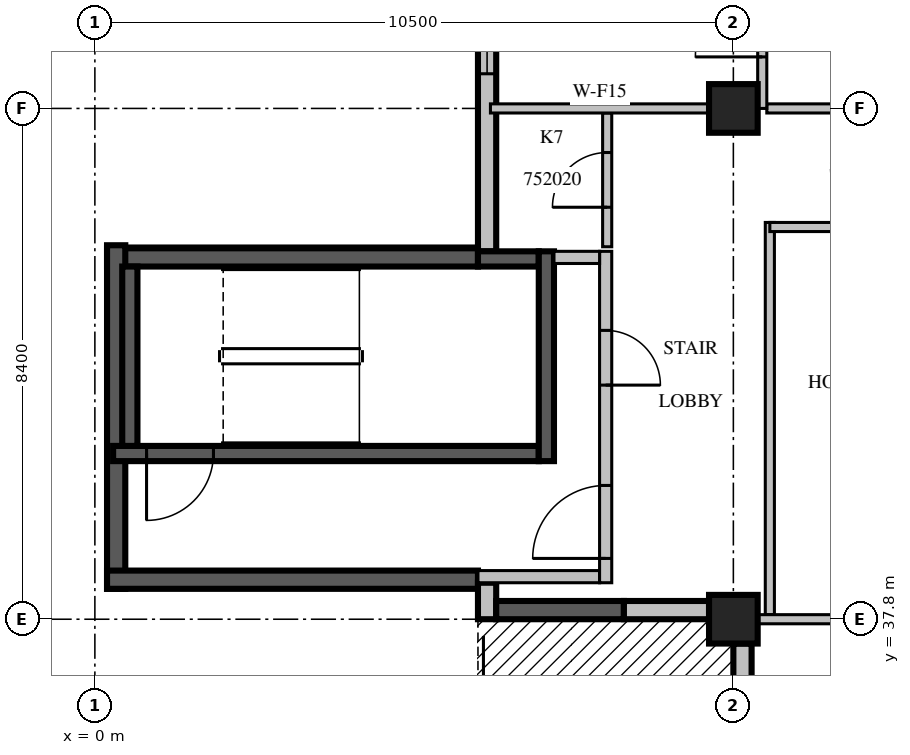
"""IFC4 building model, lengths in metres.
Left out: names, types, materials, properties, quantities, classifications, styles, units other than length and angle.
Written with IfcOpenShell. Run it as: python <this file> out.ifc"""

import sys

from ifc_helpers import new_model, si_unit, direction, frame, frame_2d, origin, origin_2d, place, context, subcontext, project, spatial, rectangle, extrude, source, transform, mapped, element, fill, save


model = new_model("IFC4")
c1 = context("Model", 3, precision=1e-05, world=origin(), true_north=direction((0.0, 1.0)))
c2 = subcontext(c1, "Body", "Model", "MODEL_VIEW")
j1 = project(units=[si_unit("LENGTHUNIT", "METRE"), si_unit("PLANEANGLEUNIT", "RADIAN")], contexts=[c1])
p1 = place(None, origin())
s1 = spatial("IfcSite", under=j1, at=p1, CompositionType="ELEMENT")
p2 = place(p1, origin())
s2 = spatial("IfcBuilding", under=s1, at=p2, CompositionType="ELEMENT")
p3 = place(p2, frame((0.0, 0.0, 231.0)))
s3 = spatial("IfcBuildingStorey", under=s2, at=p3, CompositionType="ELEMENT", Elevation=231.0)
m1 = source(origin(), c2, "Body", "SweptSolid", [
    extrude(rectangle(XDim=0.8, YDim=0.8, at=origin_2d()), origin(), (0.0, 0.0, 1.0), 3.8),
])
for number, where, z_axis, x_axis in (
    (1, (10.5, 37.8, 0.0), (0.0, 0.0, 1.0), (1.0, 0.0, 0.0)),
    (2, (10.5, 46.2, 0.0), (0.0, 0.0, 1.0), (1.0, 0.0, 0.0)),
):
    element("IfcColumn", number, at=place(p3, frame(where, z_axis=z_axis, x_axis=x_axis)), inside=s3, PredefinedType="COLUMN", context=c2, shape_type="MappedRepresentation", body=[
        mapped(m1, transform((0.0, 0.0, 0.0), scale=1.0)),
    ])
m2 = source(origin(), c2, "Body", "SweptSolid", [
    extrude(rectangle(XDim=9.91, YDim=0.3, at=frame_2d((4.955, 0.0))), origin(), (0.0, 0.0, 1.0), 3.4),
])
p4 = place(p3, frame((6.45, 53.76, 0.0), z_axis=(0.0, 0.0, 1.0), x_axis=(0.0, -1.0, 0.0)))
e3 = element("IfcWall", 3, at=p4, inside=s3, PredefinedType="STANDARD", context=c2, shape_type="MappedRepresentation", body=[
    mapped(m2, transform((0.0, 0.0, 0.0), scale=1.0)),
])
m3 = source(origin(), c2, "Body", "SweptSolid", [
    extrude(rectangle(XDim=3.6, YDim=2.3, at=frame_2d((1.8, 1.15))), frame((0.0, 0.16, 0.0), z_axis=(0.0, -1.0, 0.0), x_axis=(1.0, 0.0, 0.0)), (0.0, 0.0, 1.0), 0.32),
])
p5 = place(p4, frame((3.39, 0.0, 0.6)))
e4 = element("IfcOpeningElement", 4, at=p5, cuts=e3, PredefinedType="OPENING", context=c2, shape_type="MappedRepresentation", body=[
    mapped(m3, transform((0.0, 0.0, 0.0), scale=1.0)),
])
m4 = source(origin(), c2, "Body", "SweptSolid", [
    extrude(rectangle(XDim=2.4, YDim=2.3, at=frame_2d((1.2, 1.15))), frame((0.0, 0.16, 0.0), z_axis=(0.0, -1.0, 0.0), x_axis=(1.0, 0.0, 0.0)), (0.0, 0.0, 1.0), 0.32),
])
p6 = place(p4, frame((0.495, 0.0, 0.6)))
e5 = element("IfcOpeningElement", 5, at=p6, cuts=e3, PredefinedType="OPENING", context=c2, shape_type="MappedRepresentation", body=[
    mapped(m4, transform((0.0, 0.0, 0.0), scale=1.0)),
])
m5 = source(origin(), c2, "Body", "SweptSolid", [
    extrude(rectangle(XDim=6.1, YDim=0.3, at=frame_2d((3.05, 0.0))), origin(), (0.0, 0.0, 1.0), 3.4),
])
p7 = place(p3, frame((6.3, 43.75, 0.0), z_axis=(0.0, 0.0, 1.0), x_axis=(-1.0, 0.0, 0.0)))
e6 = element("IfcWall", 6, at=p7, inside=s3, PredefinedType="SOLIDWALL", context=c2, shape_type="MappedRepresentation", body=[
    mapped(m5, transform((0.0, 0.0, 0.0), scale=1.0)),
])
m6 = source(origin(), c2, "Body", "SweptSolid", [
    extrude(rectangle(XDim=5.65, YDim=0.3, at=frame_2d((2.825, 0.0))), origin(), (0.0, 0.0, 1.0), 3.4),
])
p8 = place(p3, frame((0.35, 43.95, 0.0), z_axis=(0.0, 0.0, 1.0), x_axis=(0.0, -1.0, 0.0)))
e7 = element("IfcWall", 7, at=p8, inside=s3, PredefinedType="SOLIDWALL", context=c2, shape_type="MappedRepresentation", body=[
    mapped(m6, transform((0.0, 0.0, 0.0), scale=1.0)),
])
p9 = place(p3, frame((0.2, 38.45, 0.0), z_axis=(0.0, 0.0, 1.0), x_axis=(1.0, 0.0, 0.0)))
e8 = element("IfcWall", 8, at=p9, inside=s3, PredefinedType="SOLIDWALL", context=c2, shape_type="MappedRepresentation", body=[
    mapped(m5, transform((0.0, 0.0, 0.0), scale=1.0)),
])
m7 = source(origin(), c2, "Body", "SweptSolid", [
    extrude(rectangle(XDim=0.6, YDim=0.3, at=frame_2d((0.3, 0.0))), origin(), (0.0, 0.0, 1.0), 3.4),
])
p10 = place(p3, frame((6.45, 38.4, 0.0), z_axis=(0.0, 0.0, 1.0), x_axis=(0.0, -1.0, 0.0)))
e9 = element("IfcWall", 9, at=p10, inside=s3, PredefinedType="STANDARD", context=c2, shape_type="MappedRepresentation", body=[
    mapped(m7, transform((0.0, 0.0, 0.0), scale=1.0)),
])
m8 = source(origin(), c2, "Body", "SweptSolid", [
    extrude(rectangle(XDim=2.1, YDim=0.3, at=frame_2d((1.05, 0.0))), origin(), (0.0, 0.0, 1.0), 3.4),
])
p11 = place(p3, frame((6.6, 37.95, 0.0), z_axis=(0.0, 0.0, 1.0), x_axis=(1.0, 0.0, 0.0)))
e10 = element("IfcWall", 10, at=p11, inside=s3, PredefinedType="SOLIDWALL", context=c2, shape_type="MappedRepresentation", body=[
    mapped(m8, transform((0.0, 0.0, 0.0), scale=1.0)),
])
p12 = place(p3, frame((8.7, 37.95, 0.0), z_axis=(0.0, 0.0, 1.0), x_axis=(1.0, 0.0, 0.0)))
e11 = element("IfcWall", 11, at=p12, inside=s3, PredefinedType="STANDARD", context=c2, shape_type="SweptSolid", body=[
    extrude(rectangle(XDim=1.4, YDim=0.3, at=frame_2d((0.7, 0.0))), origin(), (0.0, 0.0, 1.0), 3.4),
])
m9 = source(origin(), c2, "Body", "SweptSolid", [
    extrude(rectangle(XDim=7.6, YDim=0.3, at=frame_2d((3.8, 0.0))), origin(), (0.0, 0.0, 1.0), 3.4),
])
p13 = place(p3, frame((10.65, 37.4, 0.0), z_axis=(0.0, 0.0, 1.0), x_axis=(0.0, -1.0, 0.0)))
e12 = element("IfcWall", 12, at=p13, inside=s3, PredefinedType="STANDARD", context=c2, shape_type="MappedRepresentation", body=[
    mapped(m9, transform((0.0, 0.0, 0.0), scale=1.0)),
])
m10 = source(origin(), c2, "Body", "SweptSolid", [
    extrude(rectangle(XDim=1.8, YDim=2.4, at=frame_2d((0.9, 1.2))), frame((0.0, 0.16, 0.0), z_axis=(0.0, -1.0, 0.0), x_axis=(1.0, 0.0, 0.0)), (0.0, 0.0, 1.0), 0.32),
])
p14 = place(p13, frame((0.65, 0.0, 0.0)))
e13 = element("IfcOpeningElement", 13, at=p14, cuts=e12, PredefinedType="OPENING", context=c2, shape_type="MappedRepresentation", body=[
    mapped(m10, transform((0.0, 0.0, 0.0), scale=1.0)),
])
m11 = source(origin(), c2, "Body", "SweptSolid", [
    extrude(rectangle(XDim=1.2, YDim=2.3, at=frame_2d((0.6, 1.15))), frame((0.0, 0.16, 0.0), z_axis=(0.0, -1.0, 0.0), x_axis=(1.0, 0.0, 0.0)), (0.0, 0.0, 1.0), 0.32),
])
p15 = place(p13, frame((4.061, 0.0, 0.6)))
e14 = element("IfcOpeningElement", 14, at=p15, cuts=e12, PredefinedType="OPENING", context=c2, shape_type="MappedRepresentation", body=[
    mapped(m11, transform((0.0, 0.0, 0.0), scale=1.0)),
])
m12 = source(origin(), c2, "Body", "SweptSolid", [
    extrude(rectangle(XDim=7.0, YDim=0.25, at=frame_2d((3.5, 0.0))), origin(), (0.0, 0.0, 1.0), 3.4),
])
p16 = place(p3, frame((0.3, 40.525, 0.0), z_axis=(0.0, 0.0, 1.0), x_axis=(1.0, 0.0, 0.0)))
e15 = element("IfcWall", 15, at=p16, inside=s3, PredefinedType="SOLIDWALL", context=c2, shape_type="MappedRepresentation", body=[
    mapped(m12, transform((0.0, 0.0, 0.0), scale=1.0)),
])
m13 = source(origin(), c2, "Body", "SweptSolid", [
    extrude(rectangle(XDim=1.1, YDim=2.1, at=frame_2d((0.55, 1.05))), frame((0.0, 0.135, 0.0), z_axis=(0.0, -1.0, 0.0), x_axis=(1.0, 0.0, 0.0)), (0.0, 0.0, 1.0), 0.27),
])
p17 = place(p16, frame((0.55, 0.0, 0.0)))
e16 = element("IfcOpeningElement", 16, at=p17, cuts=e15, PredefinedType="OPENING", context=c2, shape_type="MappedRepresentation", body=[
    mapped(m13, transform((0.0, 0.0, 0.0), scale=1.0)),
])
m14 = source(origin(), c2, "Body", "SweptSolid", [
    extrude(rectangle(XDim=1.0, YDim=0.25, at=frame_2d((0.5, 0.0))), origin(), (0.0, 0.0, 1.0), 3.4),
])
p18 = place(p3, frame((6.3, 43.725, 0.0), z_axis=(0.0, 0.0, 1.0), x_axis=(1.0, 0.0, 0.0)))
e17 = element("IfcWall", 17, at=p18, inside=s3, PredefinedType="SOLIDWALL", context=c2, shape_type="MappedRepresentation", body=[
    mapped(m14, transform((0.0, 0.0, 0.0), scale=1.0)),
])
m15 = source(origin(), c2, "Body", "SweptSolid", [
    extrude(rectangle(XDim=3.45, YDim=0.25, at=frame_2d((1.725, 0.0))), origin(), (0.0, 0.0, 1.0), 3.4),
])
p19 = place(p3, frame((7.425, 40.4, 0.0), z_axis=(0.0, 0.0, 1.0), x_axis=(0.0, 1.0, 0.0)))
e18 = element("IfcWall", 18, at=p19, inside=s3, PredefinedType="SOLIDWALL", context=c2, shape_type="MappedRepresentation", body=[
    mapped(m15, transform((0.0, 0.0, 0.0), scale=1.0)),
])
m16 = source(origin(), c2, "Body", "SweptSolid", [
    extrude(rectangle(XDim=2.95, YDim=0.25, at=frame_2d((1.475, 0.0))), origin(), (0.0, 0.0, 1.0), 3.4),
])
p20 = place(p3, frame((0.575, 40.65, 0.0), z_axis=(0.0, 0.0, 1.0), x_axis=(0.0, 1.0, 0.0)))
e19 = element("IfcWall", 19, at=p20, inside=s3, PredefinedType="SOLIDWALL", context=c2, shape_type="MappedRepresentation", body=[
    mapped(m16, transform((0.0, 0.0, 0.0), scale=1.0)),
])
m17 = source(origin(), c2, "Body", "SweptSolid", [
    extrude(rectangle(XDim=2.0, YDim=0.2, at=frame_2d((1.0, 0.0))), origin(), (0.0, 0.0, 1.0), 3.4),
])
p21 = place(p3, frame((6.3, 38.5, 0.0), z_axis=(0.0, 0.0, 1.0), x_axis=(1.0, 0.0, 0.0)))
e20 = element("IfcWall", 20, at=p21, inside=s3, PredefinedType="PARTITIONING", context=c2, shape_type="MappedRepresentation", body=[
    mapped(m17, transform((0.0, 0.0, 0.0), scale=1.0)),
])
m18 = source(origin(), c2, "Body", "SweptSolid", [
    extrude(rectangle(XDim=5.45, YDim=0.2, at=frame_2d((2.725, 0.0))), origin(), (0.0, 0.0, 1.0), 3.4),
])
p22 = place(p3, frame((8.4, 38.4, 0.0), z_axis=(0.0, 0.0, 1.0), x_axis=(0.0, 1.0, 0.0)))
e21 = element("IfcWall", 21, at=p22, inside=s3, PredefinedType="PARTITIONING", context=c2, shape_type="MappedRepresentation", body=[
    mapped(m18, transform((0.0, 0.0, 0.0), scale=1.0)),
])
m19 = source(origin(), c2, "Body", "SweptSolid", [
    extrude(rectangle(XDim=1.2, YDim=2.1, at=frame_2d((0.6, 1.05))), frame((0.0, 0.11, 0.0), z_axis=(0.0, -1.0, 0.0), x_axis=(1.0, 0.0, 0.0)), (0.0, 0.0, 1.0), 0.22),
])
p23 = place(p22, frame((0.4, 0.0, 0.0)))
e22 = element("IfcOpeningElement", 22, at=p23, cuts=e21, PredefinedType="OPENING", context=c2, shape_type="MappedRepresentation", body=[
    mapped(m19, transform((0.0, 0.0, 0.0), scale=1.0)),
])
m20 = source(origin(), c2, "Body", "SweptSolid", [
    extrude(rectangle(XDim=0.9, YDim=2.1, at=frame_2d((0.45, 1.05))), frame((0.0, 0.11, 0.0), z_axis=(0.0, -1.0, 0.0), x_axis=(1.0, 0.0, 0.0)), (0.0, 0.0, 1.0), 0.22),
])
p24 = place(p22, frame((3.25, 0.0, 0.0)))
e23 = element("IfcOpeningElement", 23, at=p24, cuts=e21, PredefinedType="OPENING", context=c2, shape_type="MappedRepresentation", body=[
    mapped(m20, transform((0.0, 0.0, 0.0), scale=1.0)),
])
m21 = source(origin(), c2, "Body", "SweptSolid", [
    extrude(rectangle(XDim=0.75, YDim=0.2, at=frame_2d((0.375, 0.0))), origin(), (0.0, 0.0, 1.0), 3.4),
])
p25 = place(p3, frame((7.55, 43.75, 0.0), z_axis=(0.0, 0.0, 1.0), x_axis=(1.0, 0.0, 0.0)))
e24 = element("IfcWall", 24, at=p25, inside=s3, PredefinedType="PARTITIONING", context=c2, shape_type="MappedRepresentation", body=[
    mapped(m21, transform((0.0, 0.0, 0.0), scale=1.0)),
])
m22 = source(origin(), c2, "Body", "SweptSolid", [
    extrude(rectangle(XDim=6.45, YDim=0.15, at=frame_2d((3.225, 0.0))), origin(), (0.0, 0.0, 1.0), 3.4),
])
p26 = place(p3, frame((11.1, 44.325, 0.0), z_axis=(0.0, 0.0, 1.0), x_axis=(0.0, -1.0, 0.0)))
e25 = element("IfcWall", 25, at=p26, inside=s3, PredefinedType="PARTITIONING", context=c2, shape_type="MappedRepresentation", body=[
    mapped(m22, transform((0.0, 0.0, 0.0), scale=1.0)),
])
m23 = source(origin(), c2, "Body", "SweptSolid", [
    extrude(rectangle(XDim=3.975, YDim=0.15, at=frame_2d((1.988, 0.0))), origin(), (0.0, 0.0, 1.0), 3.4),
])
p27 = place(p3, frame((15.075, 44.25, 0.0), z_axis=(0.0, 0.0, 1.0), x_axis=(-1.0, 0.0, 0.0)))
e26 = element("IfcWall", 26, at=p27, inside=s3, PredefinedType="PARTITIONING", context=c2, shape_type="MappedRepresentation", body=[
    mapped(m23, transform((0.0, 0.0, 0.0), scale=1.0)),
])
m24 = source(origin(), c2, "Body", "SweptSolid", [
    extrude(rectangle(XDim=2.2, YDim=0.15, at=frame_2d((1.1, 0.0))), origin(), (0.0, 0.0, 1.0), 3.4),
])
p28 = place(p3, frame((8.425, 43.925, 0.0), z_axis=(0.0, 0.0, 1.0), x_axis=(0.0, 1.0, 0.0)))
e27 = element("IfcWall", 27, at=p28, inside=s3, PredefinedType="PARTITIONING", context=c2, shape_type="MappedRepresentation", body=[
    mapped(m24, transform((0.0, 0.0, 0.0), scale=1.0)),
])
m25 = source(origin(), c2, "Body", "SweptSolid", [
    extrude(rectangle(XDim=0.9, YDim=2.1, at=frame_2d((0.45, 1.05))), frame((0.0, 0.085, 0.0), z_axis=(0.0, -1.0, 0.0), x_axis=(1.0, 0.0, 0.0)), (0.0, 0.0, 1.0), 0.17),
])
p29 = place(p28, frame((0.65, 0.0, 0.0)))
e28 = element("IfcOpeningElement", 28, at=p29, cuts=e27, PredefinedType="OPENING", context=c2, shape_type="MappedRepresentation", body=[
    mapped(m25, transform((0.0, 0.0, 0.0), scale=1.0)),
])
m26 = source(origin(), c2, "Body", "SweptSolid", [
    extrude(rectangle(XDim=4.101, YDim=0.15, at=frame_2d((2.05, 0.0))), origin(), (0.0, 0.0, 1.0), 3.4),
])
p30 = place(p3, frame((15.0, 37.8, 0.0), z_axis=(0.0, 0.0, 1.0), x_axis=(-1.0, 0.0, 0.0)))
e29 = element("IfcWall", 29, at=p30, inside=s3, PredefinedType="PARTITIONING", context=c2, shape_type="MappedRepresentation", body=[
    mapped(m26, transform((0.0, 0.0, 0.0), scale=1.0)),
])
m27 = source(origin(), c2, "Body", "SweptSolid", [
    extrude(rectangle(XDim=3.596, YDim=0.15, at=frame_2d((1.798, 0.0))), origin(), (0.0, 0.0, 1.0), 3.4),
])
p31 = place(p3, frame((10.101, 46.2, 0.0), z_axis=(0.0, 0.0, 1.0), x_axis=(-1.0, 0.0, 0.0)))
e30 = element("IfcWall", 30, at=p31, inside=s3, PredefinedType="PARTITIONING", context=c2, shape_type="MappedRepresentation", body=[
    mapped(m27, transform((0.0, 0.0, 0.0), scale=1.0)),
])
m28 = source(origin(), c2, "Body", "SweptSolid", [
    extrude(rectangle(XDim=3.95, YDim=0.15, at=frame_2d((1.975, 0.0))), origin(), (0.0, 0.0, 1.0), 3.4),
])
p32 = place(p3, frame((15.0, 46.2, 0.0), z_axis=(0.0, 0.0, 1.0), x_axis=(-1.0, 0.0, 0.0)))
e31 = element("IfcWall", 31, at=p32, inside=s3, PredefinedType="PARTITIONING", context=c2, shape_type="MappedRepresentation", body=[
    mapped(m28, transform((0.0, 0.0, 0.0), scale=1.0)),
])
m29 = source(origin(), c2, "Body", "SweptSolid", [
    extrude(rectangle(XDim=7.26, YDim=0.15, at=frame_2d((3.63, 0.0))), origin(), (0.0, 0.0, 1.0), 3.4),
])
p33 = place(p3, frame((10.975, 46.2, 0.0), z_axis=(0.0, 0.0, 1.0), x_axis=(0.0, 1.0, 0.0)))
e32 = element("IfcWall", 32, at=p33, inside=s3, PredefinedType="PARTITIONING", context=c2, shape_type="MappedRepresentation", body=[
    mapped(m29, transform((0.0, 0.0, 0.0), scale=1.0)),
])
m30 = source(origin(), c2, "Body", "SweptSolid", [
    extrude(rectangle(XDim=1.1, YDim=2.1, at=frame_2d((0.55, 1.05))), frame((0.0, 0.085, 0.0), z_axis=(0.0, -1.0, 0.0), x_axis=(1.0, 0.0, 0.0)), (0.0, 0.0, 1.0), 0.17),
])
p34 = place(p33, frame((0.847, 0.0, 0.0)))
e33 = element("IfcOpeningElement", 33, at=p34, cuts=e32, PredefinedType="OPENING", context=c2, shape_type="MappedRepresentation", body=[
    mapped(m30, transform((0.0, 0.0, 0.0), scale=1.0)),
])
p35 = place(p33, frame((2.946, 0.0, 0.0)))
e34 = element("IfcOpeningElement", 34, at=p35, cuts=e32, PredefinedType="OPENING", context=c2, shape_type="MappedRepresentation", body=[
    mapped(m25, transform((0.0, 0.0, 0.0), scale=1.0)),
])
p36 = place(p33, frame((4.529, 0.0, 0.0)))
e35 = element("IfcOpeningElement", 35, at=p36, cuts=e32, PredefinedType="OPENING", context=c2, shape_type="MappedRepresentation", body=[
    mapped(m25, transform((0.0, 0.0, 0.0), scale=1.0)),
])
m31 = source(origin(), c2, "Body", "SweptSolid", [
    extrude(rectangle(XDim=3.6, YDim=2.3, at=frame_2d((1.8, 1.15))), frame((0.0, 0.03, 0.0), z_axis=(0.0, -1.0, 0.0), x_axis=(1.0, 0.0, 0.0)), (0.0, 0.0, 1.0), 0.06),
])
p37 = place(p5, origin())
e36 = element("IfcWindow", 36, at=p37, inside=s3, PartitioningType="SINGLE_PANEL", PredefinedType="WINDOW", context=c2, shape_type="MappedRepresentation", body=[
    mapped(m31, transform((0.0, 0.0, 0.0), scale=1.0)),
])
fill(e4, e36)
m32 = source(origin(), c2, "Body", "SweptSolid", [
    extrude(rectangle(XDim=1.1, YDim=2.1, at=frame_2d((0.55, 1.05))), frame((0.0, 0.025, 0.0), z_axis=(0.0, -1.0, 0.0), x_axis=(1.0, 0.0, 0.0)), (0.0, 0.0, 1.0), 0.05),
])
p38 = place(p17, origin())
e37 = element("IfcDoor", 37, at=p38, inside=s3, OperationType="SINGLE_SWING_RIGHT", PredefinedType="DOOR", context=c2, shape_type="MappedRepresentation", body=[
    mapped(m32, transform((0.0, 0.0, 0.0), scale=1.0)),
])
fill(e16, e37)
m33 = source(origin(), c2, "Body", "SweptSolid", [
    extrude(rectangle(XDim=1.2, YDim=2.1, at=frame_2d((0.6, 1.05))), frame((0.0, 0.025, 0.0), z_axis=(0.0, -1.0, 0.0), x_axis=(1.0, 0.0, 0.0)), (0.0, 0.0, 1.0), 0.05),
])
p39 = place(p23, origin())
e38 = element("IfcDoor", 38, at=p39, inside=s3, OperationType="SINGLE_SWING_LEFT", PredefinedType="DOOR", context=c2, shape_type="MappedRepresentation", body=[
    mapped(m33, transform((0.0, 0.0, 0.0), scale=1.0)),
])
fill(e22, e38)
m34 = source(origin(), c2, "Body", "SweptSolid", [
    extrude(rectangle(XDim=0.9, YDim=2.1, at=frame_2d((0.45, 1.05))), frame((0.0, 0.025, 0.0), z_axis=(0.0, -1.0, 0.0), x_axis=(1.0, 0.0, 0.0)), (0.0, 0.0, 1.0), 0.05),
])
p40 = place(p24, origin())
e39 = element("IfcDoor", 39, at=p40, inside=s3, OperationType="SINGLE_SWING_RIGHT", PredefinedType="DOOR", context=c2, shape_type="MappedRepresentation", body=[
    mapped(m34, transform((0.0, 0.0, 0.0), scale=1.0)),
])
fill(e23, e39)
p41 = place(p29, origin())
e40 = element("IfcDoor", 40, at=p41, inside=s3, OperationType="SINGLE_SWING_LEFT", PredefinedType="DOOR", context=c2, shape_type="MappedRepresentation", body=[
    mapped(m34, transform((0.0, 0.0, 0.0), scale=1.0)),
])
fill(e28, e40)
p42 = place(p34, origin())
e41 = element("IfcDoor", 41, at=p42, inside=s3, OperationType="SINGLE_SWING_LEFT", PredefinedType="DOOR", context=c2, shape_type="MappedRepresentation", body=[
    mapped(m32, transform((0.0, 0.0, 0.0), scale=1.0)),
])
fill(e33, e41)
save(model, sys.argv[1])
